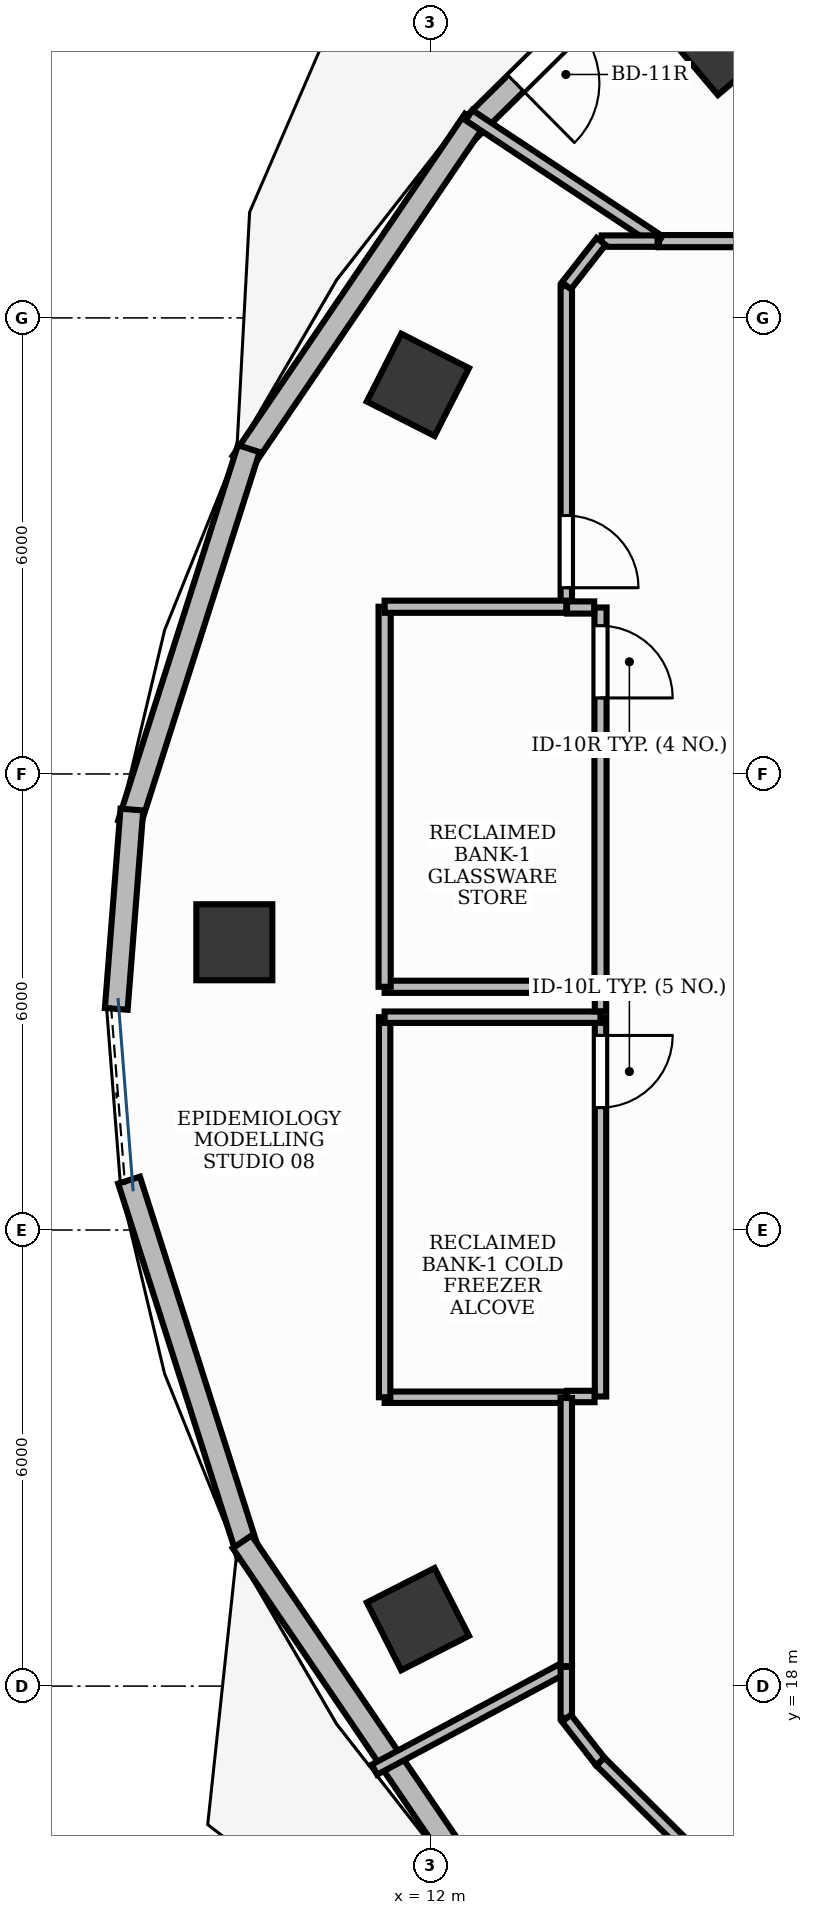
"""IFC4 building model, lengths in metres.
Left out: names, types, materials, properties, quantities, classifications, styles, units other than length and angle.
Written with IfcOpenShell. Run it as: python <this file> out.ifc"""

import sys

from ifc_helpers import new_model, si_unit, direction, frame, frame_2d, origin, origin_2d, place, context, subcontext, project, spatial, rectangle, extrude, element, fill, save


model = new_model("IFC4")
c1 = context("Model", 3, precision=1e-05, world=origin(), true_north=direction((0.0, 1.0)))
c2 = subcontext(c1, "Body", "Model", "MODEL_VIEW")
j1 = project(units=[si_unit("LENGTHUNIT", "METRE"), si_unit("PLANEANGLEUNIT", "RADIAN")], contexts=[c1])
p1 = place(None, origin())
s1 = spatial("IfcSite", under=j1, at=p1, CompositionType="ELEMENT")
p2 = place(p1, origin())
s2 = spatial("IfcBuilding", under=s1, at=p2, CompositionType="ELEMENT")
p3 = place(p2, frame((0.0, 0.0, 166.8)))
s3 = spatial("IfcBuildingStorey", under=s2, at=p3, CompositionType="ELEMENT", Elevation=166.8)
for number, where, z_axis, x_axis in (
    (1, (15.844, 39.637, -0.0), (0.0, 0.0, 1.0), (0.764, 0.645, 0.0)),
    (2, (11.838, 35.119, -0.0), (0.0, 0.0, 1.0), (0.453, 0.891, 0.0)),
    (3, (9.423, 27.786, -0.0), (0.0, 0.0, 1.0), (0.0, 1.0, 0.0)),
    (4, (11.838, 18.881, -0.0), (0.0, 0.0, 1.0), (-0.453, 0.891, 0.0)),
):
    element("IfcColumn", number, at=place(p3, frame(where, z_axis=z_axis, x_axis=x_axis)), inside=s3, PredefinedType="COLUMN", context=c2, shape_type="SweptSolid", body=[
        extrude(rectangle(XDim=1.0, YDim=1.0, at=origin_2d()), origin(), (0.0, 0.0, 1.0), 3.901),
    ])
p4 = place(p3, frame((14.546, 40.489, 0.0), z_axis=(0.0, 0.0, 1.0), x_axis=(-0.711442799636, -0.70274400947, 0.0)))
e5 = element("IfcWall", 5, at=p4, inside=s3, PredefinedType="STANDARD", context=c2, shape_type="SweptSolid", body=[
    extrude(rectangle(XDim=2.891, YDim=0.3, at=frame_2d((1.445, 0.0))), origin(), (0.0, 0.0, 1.0), 3.9),
])
p5 = place(p4, frame((0.896, 0.0, 0.0)))
e6 = element("IfcOpeningElement", 6, at=p5, cuts=e5, PredefinedType="OPENING", context=c2, shape_type="SweptSolid", body=[
    extrude(rectangle(XDim=1.1, YDim=2.15, at=frame_2d((0.55, 1.075))), frame((0.0, 0.165, 0.0), z_axis=(0.0, -1.0, 0.0), x_axis=(1.0, 0.0, 0.0)), (0.0, 0.0, 1.0), 0.33),
])
p6 = place(p3, frame((12.58, 38.601, 0.0), z_axis=(0.0, 0.0, 1.0), x_axis=(-0.561663900064, -0.827365495634, 0.0)))
e7 = element("IfcWall", 7, at=p6, inside=s3, PredefinedType="STANDARD", context=c2, shape_type="SweptSolid", body=[
    extrude(rectangle(XDim=5.438, YDim=0.3, at=frame_2d((2.719, 0.0))), origin(), (0.0, 0.0, 1.0), 3.47),
])
p7 = place(p3, frame((9.613, 34.28, 0.0), z_axis=(0.0, 0.0, 1.0), x_axis=(-0.303930984078, -0.952694052106, 0.0)))
e8 = element("IfcWall", 8, at=p7, inside=s3, PredefinedType="STANDARD", context=c2, shape_type="SweptSolid", body=[
    extrude(rectangle(XDim=5.181, YDim=0.3, at=frame_2d((2.591, 0.0))), origin(), (0.0, 0.0, 1.0), 3.47),
])
p8 = place(p3, frame((8.075, 29.531, 0.0), z_axis=(0.0, 0.0, 1.0), x_axis=(-0.078059201014, -0.99694872543, 0.0)))
e9 = element("IfcWall", 9, at=p8, inside=s3, PredefinedType="STANDARD", context=c2, shape_type="SweptSolid", body=[
    extrude(rectangle(XDim=2.63, YDim=0.3, at=frame_2d((1.315, 0.0))), origin(), (0.0, 0.0, 1.0), 3.47),
])
p9 = place(p3, frame((8.038, 24.656, 0.0), z_axis=(0.0, 0.0, 1.0), x_axis=(0.303930984078, -0.952694052106, 0.0)))
e10 = element("IfcWall", 10, at=p9, inside=s3, PredefinedType="STANDARD", context=c2, shape_type="SweptSolid", body=[
    extrude(rectangle(XDim=5.181, YDim=0.3, at=frame_2d((2.591, 0.0))), origin(), (0.0, 0.0, 1.0), 3.9),
])
p10 = place(p3, frame((9.526, 19.898, 0.0), z_axis=(0.0, 0.0, 1.0), x_axis=(0.561663900064, -0.827365495634, 0.0)))
e11 = element("IfcWall", 11, at=p10, inside=s3, PredefinedType="STANDARD", context=c2, shape_type="SweptSolid", body=[
    extrude(rectangle(XDim=5.438, YDim=0.3, at=frame_2d((2.719, 0.0))), origin(), (0.0, 0.0, 1.0), 3.9),
])
p11 = place(p3, frame((14.24, 26.8, 0.0), z_axis=(0.0, 0.0, 1.0), x_axis=(0.0, -1.0, 0.0)))
e12 = element("IfcWall", 12, at=p11, inside=s3, PredefinedType="PARTITIONING", context=c2, shape_type="SweptSolid", body=[
    extrude(rectangle(XDim=4.99, YDim=0.15, at=frame_2d((2.495, 0.0))), origin(), (0.0, 0.0, 1.0), 2.91),
])
p12 = place(p11, frame((0.24, 0.0, 0.0)))
e13 = element("IfcOpeningElement", 13, at=p12, cuts=e12, PredefinedType="OPENING", context=c2, shape_type="SweptSolid", body=[
    extrude(rectangle(XDim=0.95, YDim=2.15, at=frame_2d((0.475, 1.075))), frame((0.0, 0.09, 0.0), z_axis=(0.0, -1.0, 0.0), x_axis=(1.0, 0.0, 0.0)), (0.0, 0.0, 1.0), 0.18),
])
p13 = place(p3, frame((14.24, 32.19, 0.0), z_axis=(0.0, 0.0, 1.0), x_axis=(0.0, -1.0, 0.0)))
e14 = element("IfcWall", 14, at=p13, inside=s3, PredefinedType="PARTITIONING", context=c2, shape_type="SweptSolid", body=[
    extrude(rectangle(XDim=4.99, YDim=0.16, at=frame_2d((2.495, 0.0))), origin(), (0.0, 0.0, 1.0), 2.91),
])
p14 = place(p13, frame((0.24, 0.0, 0.0)))
e15 = element("IfcOpeningElement", 15, at=p14, cuts=e14, PredefinedType="OPENING", context=c2, shape_type="SweptSolid", body=[
    extrude(rectangle(XDim=0.95, YDim=2.15, at=frame_2d((0.475, 1.075))), frame((0.0, 0.095, 0.0), z_axis=(0.0, -1.0, 0.0), x_axis=(1.0, 0.0, 0.0)), (0.0, 0.0, 1.0), 0.19),
])
p15 = place(p3, frame((13.79, 36.417, 0.0), z_axis=(0.0, 0.0, 1.0), x_axis=(0.0, -1.0, 0.0)))
e16 = element("IfcWall", 16, at=p15, inside=s3, PredefinedType="PARTITIONING", context=c2, shape_type="SweptSolid", body=[
    extrude(rectangle(XDim=4.208, YDim=0.15, at=frame_2d((2.104, 0.0))), origin(), (0.0, 0.0, 1.0), 2.91),
])
p16 = place(p15, frame((3.017, 0.0, 0.0)))
e17 = element("IfcOpeningElement", 17, at=p16, cuts=e16, PredefinedType="OPENING", context=c2, shape_type="SweptSolid", body=[
    extrude(rectangle(XDim=0.95, YDim=2.15, at=frame_2d((0.475, 1.075))), frame((0.0, 0.09, 0.0), z_axis=(0.0, -1.0, 0.0), x_axis=(1.0, 0.0, 0.0)), (0.0, 0.0, 1.0), 0.18),
])
p17 = place(p3, frame((14.162, 21.81, 0.0), z_axis=(0.0, 0.0, 1.0), x_axis=(-1.0, 0.0, 0.0)))
e18 = element("IfcWall", 18, at=p17, inside=s3, PredefinedType="PARTITIONING", context=c2, shape_type="SweptSolid", body=[
    extrude(rectangle(XDim=0.362, YDim=0.15, at=frame_2d((0.181, 0.0))), origin(), (0.0, 0.0, 1.0), 2.91),
])
p18 = place(p3, frame((13.79, 21.8, 0.0), z_axis=(0.0, 0.0, 1.0), x_axis=(-1.0, 0.0, 0.0)))
e19 = element("IfcWall", 19, at=p18, inside=s3, PredefinedType="PARTITIONING", context=c2, shape_type="SweptSolid", body=[
    extrude(rectangle(XDim=2.39, YDim=0.15, at=frame_2d((1.195, 0.0))), origin(), (0.0, 0.0, 1.0), 2.91),
])
p19 = place(p3, frame((11.4, 21.8, 0.0), z_axis=(0.0, 0.0, 1.0), x_axis=(0.0, 1.0, 0.0)))
e20 = element("IfcWall", 20, at=p19, inside=s3, PredefinedType="PARTITIONING", context=c2, shape_type="SweptSolid", body=[
    extrude(rectangle(XDim=5.0, YDim=0.15, at=frame_2d((2.5, 0.0))), origin(), (0.0, 0.0, 1.0), 2.91),
])
p20 = place(p3, frame((11.4, 26.8, 0.0), z_axis=(0.0, 0.0, 1.0), x_axis=(1.0, 0.0, 0.0)))
e21 = element("IfcWall", 21, at=p20, inside=s3, PredefinedType="PARTITIONING", context=c2, shape_type="SweptSolid", body=[
    extrude(rectangle(XDim=2.84, YDim=0.15, at=frame_2d((1.42, 0.0))), origin(), (0.0, 0.0, 1.0), 2.91),
])
p21 = place(p3, frame((13.8, 32.19, 0.0), z_axis=(0.0, 0.0, 1.0), x_axis=(1.0, 0.0, 0.0)))
e22 = element("IfcWall", 22, at=p21, inside=s3, PredefinedType="PARTITIONING", context=c2, shape_type="SweptSolid", body=[
    extrude(rectangle(XDim=0.357, YDim=0.16, at=frame_2d((0.178, 0.0))), origin(), (0.0, 0.0, 1.0), 2.91),
])
p22 = place(p3, frame((14.24, 27.2, 0.0), z_axis=(0.0, 0.0, 1.0), x_axis=(-1.0, 0.0, 0.0)))
e23 = element("IfcWall", 23, at=p22, inside=s3, PredefinedType="PARTITIONING", context=c2, shape_type="SweptSolid", body=[
    extrude(rectangle(XDim=2.84, YDim=0.16, at=frame_2d((1.42, 0.0))), origin(), (0.0, 0.0, 1.0), 2.91),
])
p23 = place(p3, frame((11.4, 27.2, 0.0), z_axis=(0.0, 0.0, 1.0), x_axis=(0.0, 1.0, 0.0)))
e24 = element("IfcWall", 24, at=p23, inside=s3, PredefinedType="PARTITIONING", context=c2, shape_type="SweptSolid", body=[
    extrude(rectangle(XDim=5.0, YDim=0.16, at=frame_2d((2.5, 0.0))), origin(), (0.0, 0.0, 1.0), 2.91),
])
p24 = place(p3, frame((11.4, 32.2, 0.0), z_axis=(0.0, 0.0, 1.0), x_axis=(1.0, 0.0, 0.0)))
e25 = element("IfcWall", 25, at=p24, inside=s3, PredefinedType="PARTITIONING", context=c2, shape_type="SweptSolid", body=[
    extrude(rectangle(XDim=2.39, YDim=0.16, at=frame_2d((1.195, 0.0))), origin(), (0.0, 0.0, 1.0), 2.91),
])
p25 = place(p3, frame((11.266, 16.901, 0.0), z_axis=(0.0, 0.0, 1.0), x_axis=(0.8815585549, 0.472074691423, 0.0)))
e26 = element("IfcWall", 26, at=p25, inside=s3, PredefinedType="PARTITIONING", context=c2, shape_type="SweptSolid", body=[
    extrude(rectangle(XDim=2.863, YDim=0.15, at=frame_2d((1.432, 0.0))), origin(), (0.0, 0.0, 1.0), 2.91),
])
p26 = place(p3, frame((13.79, 18.253, 0.0), z_axis=(0.0, 0.0, 1.0), x_axis=(0.0, -1.0, 0.0)))
e27 = element("IfcWall", 27, at=p26, inside=s3, PredefinedType="PARTITIONING", context=c2, shape_type="SweptSolid", body=[
    extrude(rectangle(XDim=0.67, YDim=0.15, at=frame_2d((0.335, 0.0))), origin(), (0.0, 0.0, 1.0), 2.91),
])
p27 = place(p3, frame((13.792, 17.576, 0.0), z_axis=(0.0, 0.0, 1.0), x_axis=(0.615925776879, -0.787804187204, 0.0)))
e28 = element("IfcWall", 28, at=p27, inside=s3, PredefinedType="PARTITIONING", context=c2, shape_type="SweptSolid", body=[
    extrude(rectangle(XDim=0.723, YDim=0.15, at=frame_2d((0.361, 0.0))), origin(), (0.0, 0.0, 1.0), 2.91),
])
p28 = place(p3, frame((14.238, 17.006, 0.0), z_axis=(0.0, 0.0, 1.0), x_axis=(0.711447157113, -0.702739598027, 0.0)))
e29 = element("IfcWall", 29, at=p28, inside=s3, PredefinedType="PARTITIONING", context=c2, shape_type="SweptSolid", body=[
    extrude(rectangle(XDim=2.467, YDim=0.15, at=frame_2d((1.234, 0.0))), origin(), (0.0, 0.0, 1.0), 2.91),
])
p29 = place(p3, frame((17.6, 37.01, 0.0), z_axis=(0.0, 0.0, 1.0), x_axis=(-1.0, 0.0, 0.0)))
e30 = element("IfcWall", 30, at=p29, inside=s3, PredefinedType="PARTITIONING", context=c2, shape_type="SweptSolid", body=[
    extrude(rectangle(XDim=2.591, YDim=0.16, at=frame_2d((1.295, 0.0))), origin(), (0.0, 0.0, 1.0), 2.91),
])
p30 = place(p3, frame((15.01, 37.01, 0.0), z_axis=(0.0, 0.0, 1.0), x_axis=(-0.833750277905, 0.552141715589, 0.0)))
e31 = element("IfcWall", 31, at=p30, inside=s3, PredefinedType="PARTITIONING", context=c2, shape_type="SweptSolid", body=[
    extrude(rectangle(XDim=2.998, YDim=0.16, at=frame_2d((1.499, 0.0))), origin(), (0.0, 0.0, 1.0), 2.91),
])
p31 = place(p3, frame((14.991, 37.01, 0.0), z_axis=(0.0, 0.0, 1.0), x_axis=(-1.0, 0.0, 0.0)))
e32 = element("IfcWall", 32, at=p31, inside=s3, PredefinedType="PARTITIONING", context=c2, shape_type="SweptSolid", body=[
    extrude(rectangle(XDim=0.736, YDim=0.15, at=frame_2d((0.368, 0.0))), origin(), (0.0, 0.0, 1.0), 2.91),
])
p32 = place(p3, frame((14.248, 37.006, 0.0), z_axis=(0.0, 0.0, 1.0), x_axis=(-0.616041172792, -0.787713954063, 0.0)))
e33 = element("IfcWall", 33, at=p32, inside=s3, PredefinedType="PARTITIONING", context=c2, shape_type="SweptSolid", body=[
    extrude(rectangle(XDim=0.74, YDim=0.15, at=frame_2d((0.37, 0.0))), origin(), (0.0, 0.0, 1.0), 2.91),
])
p33 = place(p3, frame((14.24, 27.117, 0.0), z_axis=(0.0, 0.0, 1.0), x_axis=(0.0, -1.0, 0.0)))
e34 = element("IfcWall", 34, at=p33, inside=s3, PredefinedType="PARTITIONING", context=c2, shape_type="SweptSolid", body=[
    extrude(rectangle(XDim=0.239, YDim=0.15, at=frame_2d((0.12, 0.0))), origin(), (0.0, 0.0, 1.0), 2.91),
])
p34 = place(p3, frame((13.79, 21.79, 0.0), z_axis=(0.0, 0.0, 1.0), x_axis=(0.0, -1.0, 0.0)))
e35 = element("IfcWall", 35, at=p34, inside=s3, PredefinedType="PARTITIONING", context=c2, shape_type="SweptSolid", body=[
    extrude(rectangle(XDim=3.527, YDim=0.15, at=frame_2d((1.764, 0.0))), origin(), (0.0, 0.0, 1.0), 2.91),
])
p35 = place(p5, origin())
e36 = element("IfcDoor", 36, at=p35, inside=s3, OperationType="SINGLE_SWING_RIGHT", PredefinedType="DOOR", context=c2, shape_type="SweptSolid", body=[
    extrude(rectangle(XDim=1.1, YDim=2.15, at=frame_2d((0.55, 1.075))), frame((0.0, 0.025, 0.0), z_axis=(0.0, -1.0, 0.0), x_axis=(1.0, 0.0, 0.0)), (0.0, 0.0, 1.0), 0.05),
])
fill(e6, e36)
p36 = place(p12, origin())
e37 = element("IfcDoor", 37, at=p36, inside=s3, OperationType="SINGLE_SWING_LEFT", PredefinedType="DOOR", context=c2, shape_type="SweptSolid", body=[
    extrude(rectangle(XDim=0.95, YDim=2.15, at=frame_2d((0.475, 1.075))), frame((0.0, 0.025, 0.0), z_axis=(0.0, -1.0, 0.0), x_axis=(1.0, 0.0, 0.0)), (0.0, 0.0, 1.0), 0.05),
])
fill(e13, e37)
p37 = place(p14, origin())
e38 = element("IfcDoor", 38, at=p37, inside=s3, OperationType="SINGLE_SWING_RIGHT", PredefinedType="DOOR", context=c2, shape_type="SweptSolid", body=[
    extrude(rectangle(XDim=0.95, YDim=2.15, at=frame_2d((0.475, 1.075))), frame((0.0, 0.025, 0.0), z_axis=(0.0, -1.0, 0.0), x_axis=(1.0, 0.0, 0.0)), (0.0, 0.0, 1.0), 0.05),
])
fill(e15, e38)
p38 = place(p16, origin())
e39 = element("IfcDoor", 39, at=p38, inside=s3, OperationType="SINGLE_SWING_RIGHT", PredefinedType="DOOR", context=c2, shape_type="SweptSolid", body=[
    extrude(rectangle(XDim=0.95, YDim=2.15, at=frame_2d((0.475, 1.075))), frame((0.0, 0.025, 0.0), z_axis=(0.0, -1.0, 0.0), x_axis=(1.0, 0.0, 0.0)), (0.0, 0.0, 1.0), 0.05),
])
fill(e17, e39)
save(model, sys.argv[1])
